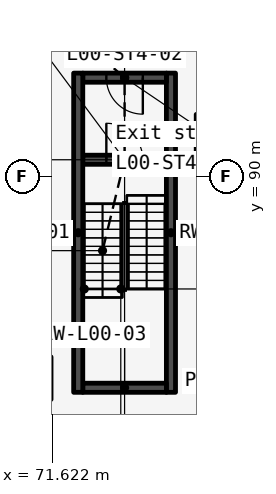
"""IFC4 building model, lengths in metres.
Left out: names, types, materials, properties, quantities, classifications, styles, units other than length and angle.
Written with IfcOpenShell. Run it as: python <this file> out.ifc"""

import sys

from ifc_helpers import new_model, si_unit, direction, frame, frame_2d, origin, origin_2d, place, context, subcontext, project, spatial, rectangle, extrude, element, fill, save


model = new_model("IFC4")
c1 = context("Model", 3, precision=1e-05, world=origin(), true_north=direction((0.0, 1.0)))
c2 = subcontext(c1, "Body", "Model", "MODEL_VIEW")
j1 = project(units=[si_unit("LENGTHUNIT", "METRE"), si_unit("PLANEANGLEUNIT", "RADIAN")], contexts=[c1])
p1 = place(None, origin())
s1 = spatial("IfcSite", under=j1, at=p1, CompositionType="ELEMENT")
p2 = place(p1, origin())
s2 = spatial("IfcBuilding", under=s1, at=p2, CompositionType="ELEMENT")
p3 = place(p2, origin())
s3 = spatial("IfcBuildingStorey", under=s2, at=p3, CompositionType="ELEMENT", Elevation=0.0)
p4 = place(p3, frame((76.956, 91.442, 0.0), z_axis=(0.0, 0.0, 1.0), x_axis=(1.0, 0.0, 0.0)))
e1 = element("IfcColumn", 1, at=p4, inside=s3, PredefinedType="COLUMN", context=c2, shape_type="SweptSolid", body=[
    extrude(rectangle(XDim=1.2, YDim=1.2, at=origin_2d()), origin(), (0.0, 0.0, 1.0), 7.5),
])
for number, where, z_axis, x_axis in (
    (2, (72.475, 82.9, 0.0), (0.0, 0.0, 1.0), (0.0, 1.0, 0.0)),
    (3, (75.525, 82.9, 0.0), (0.0, 0.0, 1.0), (0.0, 1.0, 0.0)),
):
    element("IfcWall", number, at=place(p3, frame(where, z_axis=z_axis, x_axis=x_axis)), inside=s3, PredefinedType="SOLIDWALL", context=c2, shape_type="SweptSolid", body=[
        extrude(rectangle(XDim=10.5, YDim=0.3, at=frame_2d((5.25, 0.0))), origin(), (0.0, 0.0, 1.0), 7.2),
    ])
p5 = place(p3, frame((72.625, 83.05, 0.0), z_axis=(0.0, 0.0, 1.0), x_axis=(1.0, 0.0, 0.0)))
e4 = element("IfcWall", 4, at=p5, inside=s3, PredefinedType="SOLIDWALL", context=c2, shape_type="SweptSolid", body=[
    extrude(rectangle(XDim=2.75, YDim=0.3, at=frame_2d((1.375, 0.0))), origin(), (0.0, 0.0, 1.0), 7.2),
])
p6 = place(p3, frame((72.625, 90.55, 0.0), z_axis=(0.0, 0.0, 1.0), x_axis=(1.0, 0.0, 0.0)))
e5 = element("IfcWall", 5, at=p6, inside=s3, PredefinedType="SOLIDWALL", context=c2, shape_type="SweptSolid", body=[
    extrude(rectangle(XDim=2.75, YDim=0.3, at=frame_2d((1.375, 0.0))), origin(), (0.0, 0.0, 1.0), 7.2),
])
p7 = place(p6, frame((0.775, 0.0, 0.0)))
e6 = element("IfcOpeningElement", 6, at=p7, cuts=e5, PredefinedType="OPENING", context=c2, shape_type="SweptSolid", body=[
    extrude(rectangle(XDim=1.2, YDim=2.1, at=frame_2d((0.6, 1.05))), frame((0.0, 0.16, 0.0), z_axis=(0.0, -1.0, 0.0), x_axis=(1.0, 0.0, 0.0)), (0.0, 0.0, 1.0), 0.32),
])
p8 = place(p3, frame((72.625, 93.25, 0.0), z_axis=(0.0, 0.0, 1.0), x_axis=(1.0, 0.0, 0.0)))
e7 = element("IfcWall", 7, at=p8, inside=s3, PredefinedType="SOLIDWALL", context=c2, shape_type="SweptSolid", body=[
    extrude(rectangle(XDim=2.75, YDim=0.3, at=frame_2d((1.375, 0.0))), origin(), (0.0, 0.0, 1.0), 7.2),
])
p9 = place(p8, frame((0.775, 0.0, 0.0)))
e8 = element("IfcOpeningElement", 8, at=p9, cuts=e7, PredefinedType="OPENING", context=c2, shape_type="SweptSolid", body=[
    extrude(rectangle(XDim=1.2, YDim=2.1, at=frame_2d((0.6, 1.05))), frame((0.0, 0.16, 0.0), z_axis=(0.0, -1.0, 0.0), x_axis=(1.0, 0.0, 0.0)), (0.0, 0.0, 1.0), 0.32),
])
p10 = place(p7, origin())
e9 = element("IfcDoor", 9, at=p10, inside=s3, OperationType="SINGLE_SWING_LEFT", PredefinedType="DOOR", context=c2, shape_type="SweptSolid", body=[
    extrude(rectangle(XDim=1.2, YDim=2.1, at=frame_2d((0.6, 1.05))), frame((0.0, 0.025, 0.0), z_axis=(0.0, -1.0, 0.0), x_axis=(1.0, 0.0, 0.0)), (0.0, 0.0, 1.0), 0.05),
])
fill(e6, e9)
p11 = place(p9, origin())
e10 = element("IfcDoor", 10, at=p11, inside=s3, OperationType="SINGLE_SWING_RIGHT", PredefinedType="DOOR", context=c2, shape_type="SweptSolid", body=[
    extrude(rectangle(XDim=1.2, YDim=2.1, at=frame_2d((0.6, 1.05))), frame((0.0, 0.025, 0.0), z_axis=(0.0, -1.0, 0.0), x_axis=(1.0, 0.0, 0.0)), (0.0, 0.0, 1.0), 0.05),
])
fill(e8, e10)
save(model, sys.argv[1])
